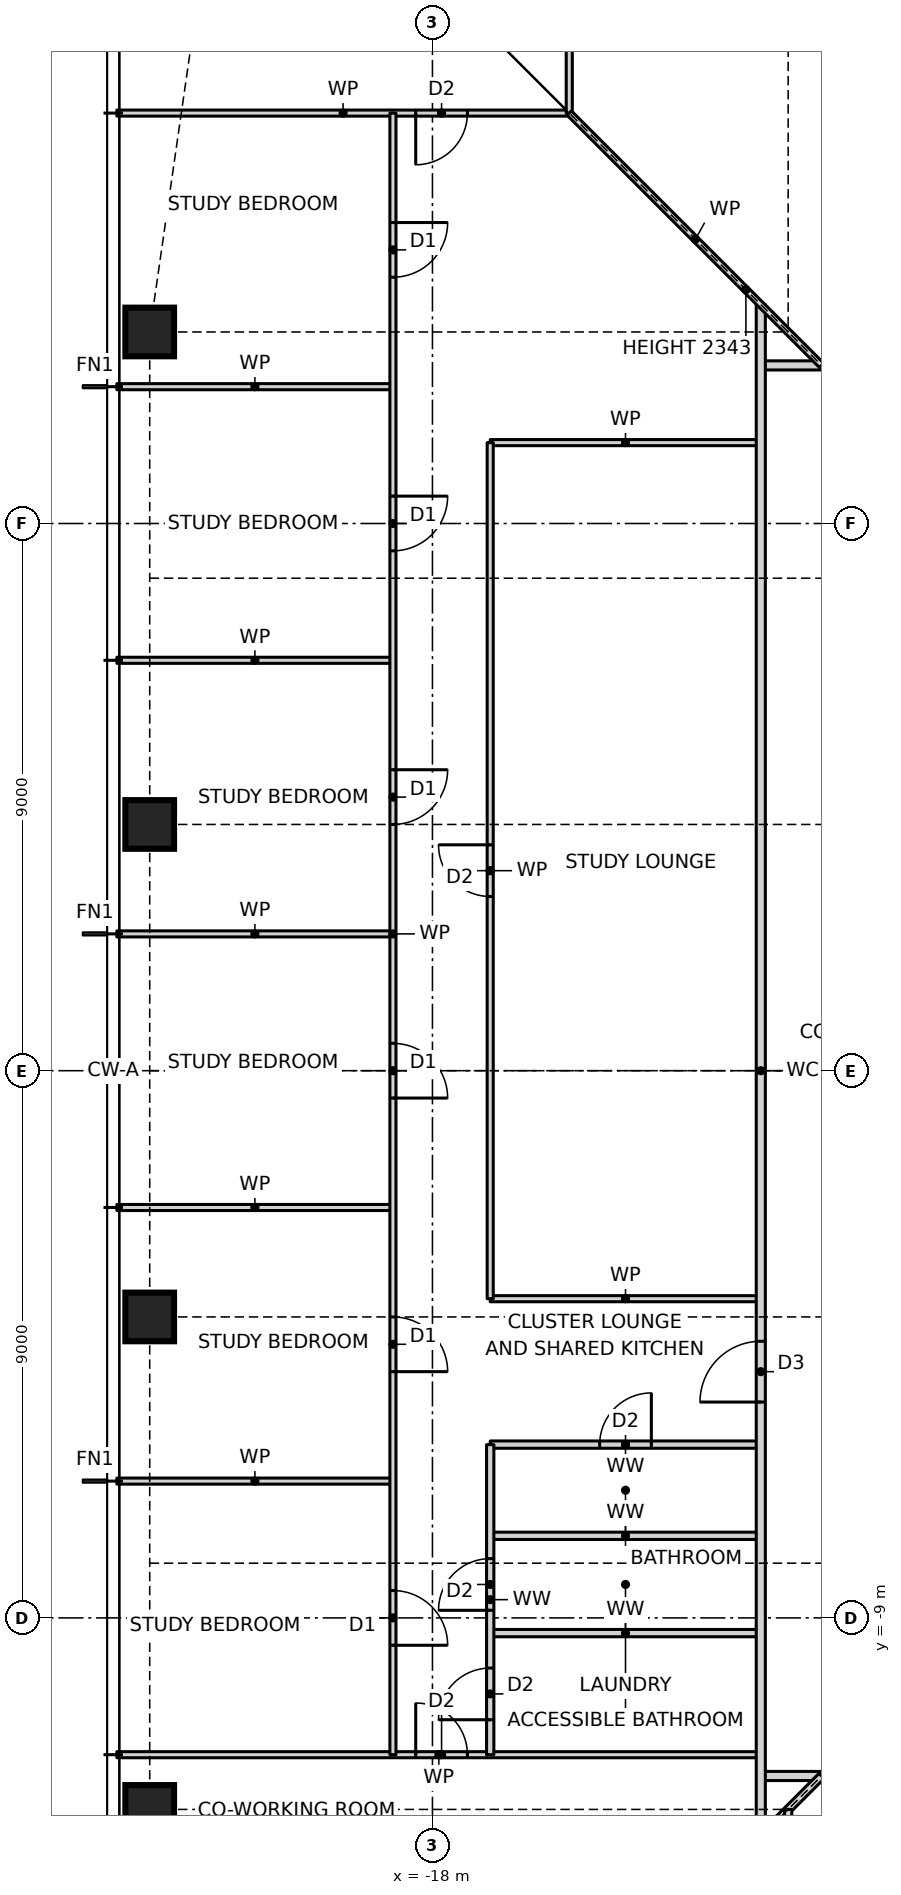
"""IFC4 building model, lengths in metres.
Left out: names, types, materials, properties, quantities, classifications, styles, units other than length and angle.
Written with IfcOpenShell. Run it as: python <this file> out.ifc"""

import sys

from ifc_helpers import new_model, si_unit, direction, frame, frame_2d, origin, origin_2d, place, context, subcontext, project, spatial, rectangle, hollow_rectangle, extrude, element, fill, save


model = new_model("IFC4")
c1 = context("Model", 3, precision=1e-05, world=origin(), true_north=direction((0.0, 1.0)))
c2 = subcontext(c1, "Body", "Model", "MODEL_VIEW")
j1 = project(units=[si_unit("LENGTHUNIT", "METRE"), si_unit("PLANEANGLEUNIT", "RADIAN")], contexts=[c1])
p1 = place(None, origin())
s1 = spatial("IfcSite", under=j1, at=p1, CompositionType="ELEMENT")
p2 = place(p1, origin())
s2 = spatial("IfcBuilding", under=s1, at=p2, CompositionType="ELEMENT")
p3 = place(p2, frame((0.0, 0.0, 46.5)))
s3 = spatial("IfcBuildingStorey", under=s2, at=p3, CompositionType="ELEMENT", Elevation=46.5)
for number, where, z_axis, x_axis in (
    (1, (-22.65, 12.15, 0.0), (0.0, 0.0, 1.0), (1.0, 0.0, 0.0)),
    (2, (-22.65, 4.05, 0.0), (0.0, 0.0, 1.0), (1.0, 0.0, 0.0)),
    (3, (-22.65, -4.05, 0.0), (0.0, 0.0, 1.0), (1.0, 0.0, 0.0)),
    (4, (-22.65, -12.15, 0.0), (0.0, 0.0, 1.0), (1.0, 0.0, 0.0)),
):
    element("IfcColumn", number, at=place(p3, frame(where, z_axis=z_axis, x_axis=x_axis)), inside=s3, PredefinedType="COLUMN", context=c2, shape_type="SweptSolid", body=[
        extrude(hollow_rectangle(XDim=0.8, YDim=0.8, WallThickness=0.09, at=origin_2d()), origin(), (0.0, 0.0, 1.0), 3.5),
    ])
p4 = place(p3, frame((-12.6, -11.6, 0.0), z_axis=(0.0, 0.0, 1.0), x_axis=(1.0, 0.0, 0.0)))
e5 = element("IfcWall", 5, at=p4, inside=s3, PredefinedType="PARTITIONING", context=c2, shape_type="SweptSolid", body=[
    extrude(rectangle(XDim=24.2, YDim=0.15, at=frame_2d((12.1, 0.0))), origin(), (0.0, 0.0, 1.0), 3.27),
])
p5 = place(p4, frame((2.64, 0.0, 0.0)))
e6 = element("IfcOpeningElement", 6, at=p5, cuts=e5, PredefinedType="OPENING", context=c2, shape_type="SweptSolid", body=[
    extrude(rectangle(XDim=1.0, YDim=2.1, at=frame_2d((0.5, 1.05))), frame((0.0, 0.085, 0.0), z_axis=(0.0, -1.0, 0.0), x_axis=(1.0, 0.0, 0.0)), (0.0, 0.0, 1.0), 0.17),
])
p6 = place(p4, frame((13.5, 0.0, 0.0)))
e7 = element("IfcOpeningElement", 7, at=p6, cuts=e5, PredefinedType="OPENING", context=c2, shape_type="SweptSolid", body=[
    extrude(rectangle(XDim=0.9, YDim=2.1, at=frame_2d((0.45, 1.05))), frame((0.0, 0.085, 0.0), z_axis=(0.0, -1.0, 0.0), x_axis=(1.0, 0.0, 0.0)), (0.0, 0.0, 1.0), 0.17),
])
p7 = place(p4, frame((22.025, 0.0, 0.0)))
e8 = element("IfcOpeningElement", 8, at=p7, cuts=e5, PredefinedType="OPENING", context=c2, shape_type="SweptSolid", body=[
    extrude(rectangle(XDim=1.0, YDim=2.1, at=frame_2d((0.5, 1.05))), frame((0.0, 0.085, 0.0), z_axis=(0.0, -1.0, 0.0), x_axis=(1.0, 0.0, 0.0)), (0.0, 0.0, 1.0), 0.17),
])
p8 = place(p3, frame((-23.19, -11.25, 0.0), z_axis=(0.0, 0.0, 1.0), x_axis=(1.0, 0.0, 0.0)))
e9 = element("IfcWall", 9, at=p8, inside=s3, PredefinedType="PARTITIONING", context=c2, shape_type="SweptSolid", body=[
    extrude(rectangle(XDim=10.59, YDim=0.1, at=frame_2d((5.295, 0.0))), origin(), (0.0, 0.0, 1.0), 3.27),
])
p9 = place(p8, frame((4.915, 0.0, 0.0)))
e10 = element("IfcOpeningElement", 10, at=p9, cuts=e9, PredefinedType="OPENING", context=c2, shape_type="SweptSolid", body=[
    extrude(rectangle(XDim=0.85, YDim=2.1, at=frame_2d((0.425, 1.05))), frame((0.0, 0.06, 0.0), z_axis=(0.0, -1.0, 0.0), x_axis=(1.0, 0.0, 0.0)), (0.0, 0.0, 1.0), 0.12),
])
for number, where, z_axis, x_axis in (
    (11, (-17.05, -9.25, 0.0), (0.0, 0.0, 1.0), (1.0, 0.0, 0.0)),
    (12, (-17.05, -7.65, 0.0), (0.0, 0.0, 1.0), (1.0, 0.0, 0.0)),
):
    element("IfcWall", number, at=place(p3, frame(where, z_axis=z_axis, x_axis=x_axis)), inside=s3, PredefinedType="PARTITIONING", context=c2, shape_type="SweptSolid", body=[
        extrude(rectangle(XDim=4.45, YDim=0.12, at=frame_2d((2.225, 0.0))), origin(), (0.0, 0.0, 1.0), 3.27),
    ])
p10 = place(p3, frame((-23.19, -6.75, 0.0), z_axis=(0.0, 0.0, 1.0), x_axis=(1.0, 0.0, 0.0)))
e13 = element("IfcWall", 13, at=p10, inside=s3, PredefinedType="PARTITIONING", context=c2, shape_type="SweptSolid", body=[
    extrude(rectangle(XDim=4.54, YDim=0.1, at=frame_2d((2.27, 0.0))), origin(), (0.0, 0.0, 1.0), 3.27),
])
p11 = place(p3, frame((-17.05, -6.15, 0.0), z_axis=(0.0, 0.0, 1.0), x_axis=(1.0, 0.0, 0.0)))
e14 = element("IfcWall", 14, at=p11, inside=s3, PredefinedType="PARTITIONING", context=c2, shape_type="SweptSolid", body=[
    extrude(rectangle(XDim=4.45, YDim=0.12, at=frame_2d((2.225, 0.0))), origin(), (0.0, 0.0, 1.0), 3.27),
])
p12 = place(p11, frame((1.8, 0.0, 0.0)))
e15 = element("IfcOpeningElement", 15, at=p12, cuts=e14, PredefinedType="OPENING", context=c2, shape_type="SweptSolid", body=[
    extrude(rectangle(XDim=0.85, YDim=2.1, at=frame_2d((0.425, 1.05))), frame((0.0, 0.07, 0.0), z_axis=(0.0, -1.0, 0.0), x_axis=(1.0, 0.0, 0.0)), (0.0, 0.0, 1.0), 0.14),
])
p13 = place(p3, frame((-17.05, -3.75, 0.0), z_axis=(0.0, 0.0, 1.0), x_axis=(1.0, 0.0, 0.0)))
e16 = element("IfcWall", 16, at=p13, inside=s3, PredefinedType="PARTITIONING", context=c2, shape_type="SweptSolid", body=[
    extrude(rectangle(XDim=4.45, YDim=0.1, at=frame_2d((2.225, 0.0))), origin(), (0.0, 0.0, 1.0), 3.27),
])
for number, where, z_axis, x_axis in (
    (17, (-23.19, -2.25, 0.0), (0.0, 0.0, 1.0), (1.0, 0.0, 0.0)),
    (18, (-23.19, 2.25, 0.0), (0.0, 0.0, 1.0), (1.0, 0.0, 0.0)),
    (19, (-23.19, 6.75, 0.0), (0.0, 0.0, 1.0), (1.0, 0.0, 0.0)),
):
    element("IfcWall", number, at=place(p3, frame(where, z_axis=z_axis, x_axis=x_axis)), inside=s3, PredefinedType="PARTITIONING", context=c2, shape_type="SweptSolid", body=[
        extrude(rectangle(XDim=4.54, YDim=0.1, at=frame_2d((2.27, 0.0))), origin(), (0.0, 0.0, 1.0), 3.27),
    ])
p14 = place(p3, frame((-17.05, 10.33, 0.0), z_axis=(0.0, 0.0, 1.0), x_axis=(1.0, 0.0, 0.0)))
e20 = element("IfcWall", 20, at=p14, inside=s3, PredefinedType="PARTITIONING", context=c2, shape_type="SweptSolid", body=[
    extrude(rectangle(XDim=4.45, YDim=0.1, at=frame_2d((2.225, 0.0))), origin(), (0.0, 0.0, 1.0), 3.27),
])
p15 = place(p3, frame((-23.19, 11.25, 0.0), z_axis=(0.0, 0.0, 1.0), x_axis=(1.0, 0.0, 0.0)))
e21 = element("IfcWall", 21, at=p15, inside=s3, PredefinedType="PARTITIONING", context=c2, shape_type="SweptSolid", body=[
    extrude(rectangle(XDim=4.54, YDim=0.1, at=frame_2d((2.27, 0.0))), origin(), (0.0, 0.0, 1.0), 3.27),
])
p16 = place(p3, frame((-12.6, 11.6, 0.0), z_axis=(0.0, 0.0, 1.0), x_axis=(1.0, 0.0, 0.0)))
e22 = element("IfcWall", 22, at=p16, inside=s3, PredefinedType="PARTITIONING", context=c2, shape_type="SweptSolid", body=[
    extrude(rectangle(XDim=24.2, YDim=0.15, at=frame_2d((12.1, 0.0))), origin(), (0.0, 0.0, 1.0), 3.27),
])
p17 = place(p16, frame((7.15, 0.0, 0.0)))
e23 = element("IfcOpeningElement", 23, at=p17, cuts=e22, PredefinedType="OPENING", context=c2, shape_type="SweptSolid", body=[
    extrude(rectangle(XDim=1.0, YDim=2.1, at=frame_2d((0.5, 1.05))), frame((0.0, 0.085, 0.0), z_axis=(0.0, -1.0, 0.0), x_axis=(1.0, 0.0, 0.0)), (0.0, 0.0, 1.0), 0.17),
])
p18 = place(p3, frame((-23.19, 15.75, 0.0), z_axis=(0.0, 0.0, 1.0), x_axis=(1.0, 0.0, 0.0)))
e24 = element("IfcWall", 24, at=p18, inside=s3, PredefinedType="PARTITIONING", context=c2, shape_type="SweptSolid", body=[
    extrude(rectangle(XDim=7.44, YDim=0.1, at=frame_2d((3.72, 0.0))), origin(), (0.0, 0.0, 1.0), 3.27),
])
p19 = place(p18, frame((4.915, 0.0, 0.0)))
e25 = element("IfcOpeningElement", 25, at=p19, cuts=e24, PredefinedType="OPENING", context=c2, shape_type="SweptSolid", body=[
    extrude(rectangle(XDim=0.85, YDim=2.1, at=frame_2d((0.425, 1.05))), frame((0.0, 0.06, 0.0), z_axis=(0.0, -1.0, 0.0), x_axis=(1.0, 0.0, 0.0)), (0.0, 0.0, 1.0), 0.12),
])
p20 = place(p3, frame((-15.75, -15.75, 0.0), z_axis=(0.0, 0.0, 1.0), x_axis=(0.707106781187, 0.707106781187, 0.0)))
e26 = element("IfcWall", 26, at=p20, inside=s3, PredefinedType="PARTITIONING", context=c2, shape_type="SweptSolid", body=[
    extrude(rectangle(XDim=5.869, YDim=0.12, at=frame_2d((2.935, 0.0))), origin(), (0.0, 0.0, 1.0), 2.343),
])
p21 = place(p3, frame((-12.15, -17.05, 0.0), z_axis=(0.0, 0.0, 1.0), x_axis=(0.0, 1.0, 0.0)))
e27 = element("IfcWall", 27, at=p21, inside=s3, PredefinedType="PARTITIONING", context=c2, shape_type="SweptSolid", body=[
    extrude(rectangle(XDim=4.9, YDim=0.12, at=frame_2d((2.45, 0.0))), origin(), (0.0, 0.0, 1.0), 2.508),
])
p22 = place(p21, frame((2.025, 0.0, 0.0)))
e28 = element("IfcOpeningElement", 28, at=p22, cuts=e27, PredefinedType="OPENING", context=c2, shape_type="SweptSolid", body=[
    extrude(rectangle(XDim=0.85, YDim=2.1, at=frame_2d((0.425, 1.05))), frame((0.0, 0.07, 0.0), z_axis=(0.0, -1.0, 0.0), x_axis=(1.0, 0.0, 0.0)), (0.0, 0.0, 1.0), 0.14),
])
p23 = place(p3, frame((-12.6, -12.6, 0.0), z_axis=(0.0, 0.0, 1.0), x_axis=(0.0, 1.0, 0.0)))
e29 = element("IfcWall", 29, at=p23, inside=s3, PredefinedType="PARTITIONING", context=c2, shape_type="SweptSolid", body=[
    extrude(rectangle(XDim=25.2, YDim=0.15, at=frame_2d((12.6, 0.0))), origin(), (0.0, 0.0, 1.0), 3.27),
])
p24 = place(p23, frame((7.15, 0.0, 0.0)))
e30 = element("IfcOpeningElement", 30, at=p24, cuts=e29, PredefinedType="OPENING", context=c2, shape_type="SweptSolid", body=[
    extrude(rectangle(XDim=1.0, YDim=2.1, at=frame_2d((0.5, 1.05))), frame((0.0, 0.085, 0.0), z_axis=(0.0, -1.0, 0.0), x_axis=(1.0, 0.0, 0.0)), (0.0, 0.0, 1.0), 0.17),
])
p25 = place(p3, frame((-15.75, 15.75, 0.0), z_axis=(0.0, 0.0, 1.0), x_axis=(0.0, 1.0, 0.0)))
e31 = element("IfcWall", 31, at=p25, inside=s3, PredefinedType="PARTITIONING", context=c2, shape_type="SweptSolid", body=[
    extrude(rectangle(XDim=7.44, YDim=0.1, at=frame_2d((3.72, 0.0))), origin(), (0.0, 0.0, 1.0), 3.27),
])
p26 = place(p3, frame((-17.05, -11.25, 0.0), z_axis=(0.0, 0.0, 1.0), x_axis=(0.0, 1.0, 0.0)))
e32 = element("IfcWall", 32, at=p26, inside=s3, PredefinedType="PARTITIONING", context=c2, shape_type="SweptSolid", body=[
    extrude(rectangle(XDim=5.1, YDim=0.12, at=frame_2d((2.55, 0.0))), origin(), (0.0, 0.0, 1.0), 3.27),
])
p27 = place(p26, frame((2.375, 0.0, 0.0)))
e33 = element("IfcOpeningElement", 33, at=p27, cuts=e32, PredefinedType="OPENING", context=c2, shape_type="SweptSolid", body=[
    extrude(rectangle(XDim=0.85, YDim=2.1, at=frame_2d((0.425, 1.05))), frame((0.0, 0.07, 0.0), z_axis=(0.0, -1.0, 0.0), x_axis=(1.0, 0.0, 0.0)), (0.0, 0.0, 1.0), 0.14),
])
p28 = place(p26, frame((0.575, 0.0, 0.0)))
e34 = element("IfcOpeningElement", 34, at=p28, cuts=e32, PredefinedType="OPENING", context=c2, shape_type="SweptSolid", body=[
    extrude(rectangle(XDim=0.85, YDim=2.1, at=frame_2d((0.425, 1.05))), frame((0.0, 0.07, 0.0), z_axis=(0.0, -1.0, 0.0), x_axis=(1.0, 0.0, 0.0)), (0.0, 0.0, 1.0), 0.14),
])
p29 = place(p3, frame((-17.05, -3.75, 0.0), z_axis=(0.0, 0.0, 1.0), x_axis=(0.0, 1.0, 0.0)))
e35 = element("IfcWall", 35, at=p29, inside=s3, PredefinedType="PARTITIONING", context=c2, shape_type="SweptSolid", body=[
    extrude(rectangle(XDim=14.08, YDim=0.1, at=frame_2d((7.04, 0.0))), origin(), (0.0, 0.0, 1.0), 3.27),
])
p30 = place(p29, frame((6.615, 0.0, 0.0)))
e36 = element("IfcOpeningElement", 36, at=p30, cuts=e35, PredefinedType="OPENING", context=c2, shape_type="SweptSolid", body=[
    extrude(rectangle(XDim=0.85, YDim=2.1, at=frame_2d((0.425, 1.05))), frame((0.0, 0.06, 0.0), z_axis=(0.0, -1.0, 0.0), x_axis=(1.0, 0.0, 0.0)), (0.0, 0.0, 1.0), 0.12),
])
p31 = place(p3, frame((-18.65, -11.25, 0.0), z_axis=(0.0, 0.0, 1.0), x_axis=(0.0, 1.0, 0.0)))
e37 = element("IfcWall", 37, at=p31, inside=s3, PredefinedType="PARTITIONING", context=c2, shape_type="SweptSolid", body=[
    extrude(rectangle(XDim=27.0, YDim=0.1, at=frame_2d((13.5, 0.0))), origin(), (0.0, 0.0, 1.0), 3.27),
])
p32 = place(p31, frame((24.3, 0.0, 0.0)))
e38 = element("IfcOpeningElement", 38, at=p32, cuts=e37, PredefinedType="OPENING", context=c2, shape_type="SweptSolid", body=[
    extrude(rectangle(XDim=0.9, YDim=2.1, at=frame_2d((0.45, 1.05))), frame((0.0, 0.06, 0.0), z_axis=(0.0, -1.0, 0.0), x_axis=(1.0, 0.0, 0.0)), (0.0, 0.0, 1.0), 0.12),
])
p33 = place(p31, frame((19.8, 0.0, 0.0)))
e39 = element("IfcOpeningElement", 39, at=p33, cuts=e37, PredefinedType="OPENING", context=c2, shape_type="SweptSolid", body=[
    extrude(rectangle(XDim=0.9, YDim=2.1, at=frame_2d((0.45, 1.05))), frame((0.0, 0.06, 0.0), z_axis=(0.0, -1.0, 0.0), x_axis=(1.0, 0.0, 0.0)), (0.0, 0.0, 1.0), 0.12),
])
p34 = place(p31, frame((15.3, 0.0, 0.0)))
e40 = element("IfcOpeningElement", 40, at=p34, cuts=e37, PredefinedType="OPENING", context=c2, shape_type="SweptSolid", body=[
    extrude(rectangle(XDim=0.9, YDim=2.1, at=frame_2d((0.45, 1.05))), frame((0.0, 0.06, 0.0), z_axis=(0.0, -1.0, 0.0), x_axis=(1.0, 0.0, 0.0)), (0.0, 0.0, 1.0), 0.12),
])
p35 = place(p31, frame((10.8, 0.0, 0.0)))
e41 = element("IfcOpeningElement", 41, at=p35, cuts=e37, PredefinedType="OPENING", context=c2, shape_type="SweptSolid", body=[
    extrude(rectangle(XDim=0.9, YDim=2.1, at=frame_2d((0.45, 1.05))), frame((0.0, 0.06, 0.0), z_axis=(0.0, -1.0, 0.0), x_axis=(1.0, 0.0, 0.0)), (0.0, 0.0, 1.0), 0.12),
])
p36 = place(p31, frame((6.3, 0.0, 0.0)))
e42 = element("IfcOpeningElement", 42, at=p36, cuts=e37, PredefinedType="OPENING", context=c2, shape_type="SweptSolid", body=[
    extrude(rectangle(XDim=0.9, YDim=2.1, at=frame_2d((0.45, 1.05))), frame((0.0, 0.06, 0.0), z_axis=(0.0, -1.0, 0.0), x_axis=(1.0, 0.0, 0.0)), (0.0, 0.0, 1.0), 0.12),
])
p37 = place(p31, frame((1.8, 0.0, 0.0)))
e43 = element("IfcOpeningElement", 43, at=p37, cuts=e37, PredefinedType="OPENING", context=c2, shape_type="SweptSolid", body=[
    extrude(rectangle(XDim=0.9, YDim=2.1, at=frame_2d((0.45, 1.05))), frame((0.0, 0.06, 0.0), z_axis=(0.0, -1.0, 0.0), x_axis=(1.0, 0.0, 0.0)), (0.0, 0.0, 1.0), 0.12),
])
p38 = place(p3, frame((-11.6, 11.6, 0.0), z_axis=(0.0, 0.0, 1.0), x_axis=(-0.707106781187, 0.707106781187, 0.0)))
e44 = element("IfcWall", 44, at=p38, inside=s3, PredefinedType="PARTITIONING", context=c2, shape_type="SweptSolid", body=[
    extrude(rectangle(XDim=5.869, YDim=0.1, at=frame_2d((2.935, 0.0))), origin(), (0.0, 0.0, 1.0), 2.343),
])
p39 = place(p32, frame((0.9, 0.0, 0.0), z_axis=(0.0, 0.0, 1.0), x_axis=(-1.0, 0.0, 0.0)))
e45 = element("IfcDoor", 45, at=p39, inside=s3, OperationType="SINGLE_SWING_LEFT", PredefinedType="DOOR", context=c2, shape_type="SweptSolid", body=[
    extrude(rectangle(XDim=0.9, YDim=2.1, at=frame_2d((0.45, 1.05))), frame((0.0, 0.025, 0.0), z_axis=(0.0, -1.0, 0.0), x_axis=(1.0, 0.0, 0.0)), (0.0, 0.0, 1.0), 0.05),
])
fill(e38, e45)
p40 = place(p33, frame((0.9, 0.0, 0.0), z_axis=(0.0, 0.0, 1.0), x_axis=(-1.0, 0.0, 0.0)))
e46 = element("IfcDoor", 46, at=p40, inside=s3, OperationType="SINGLE_SWING_LEFT", PredefinedType="DOOR", context=c2, shape_type="SweptSolid", body=[
    extrude(rectangle(XDim=0.9, YDim=2.1, at=frame_2d((0.45, 1.05))), frame((0.0, 0.025, 0.0), z_axis=(0.0, -1.0, 0.0), x_axis=(1.0, 0.0, 0.0)), (0.0, 0.0, 1.0), 0.05),
])
fill(e39, e46)
p41 = place(p34, frame((0.9, 0.0, 0.0), z_axis=(0.0, 0.0, 1.0), x_axis=(-1.0, 0.0, 0.0)))
e47 = element("IfcDoor", 47, at=p41, inside=s3, OperationType="SINGLE_SWING_LEFT", PredefinedType="DOOR", context=c2, shape_type="SweptSolid", body=[
    extrude(rectangle(XDim=0.9, YDim=2.1, at=frame_2d((0.45, 1.05))), frame((0.0, 0.025, 0.0), z_axis=(0.0, -1.0, 0.0), x_axis=(1.0, 0.0, 0.0)), (0.0, 0.0, 1.0), 0.05),
])
fill(e40, e47)
p42 = place(p35, frame((0.9, 0.0, 0.0), z_axis=(0.0, 0.0, 1.0), x_axis=(-1.0, 0.0, 0.0)))
e48 = element("IfcDoor", 48, at=p42, inside=s3, OperationType="SINGLE_SWING_RIGHT", PredefinedType="DOOR", context=c2, shape_type="SweptSolid", body=[
    extrude(rectangle(XDim=0.9, YDim=2.1, at=frame_2d((0.45, 1.05))), frame((0.0, 0.025, 0.0), z_axis=(0.0, -1.0, 0.0), x_axis=(1.0, 0.0, 0.0)), (0.0, 0.0, 1.0), 0.05),
])
fill(e41, e48)
p43 = place(p36, frame((0.9, 0.0, 0.0), z_axis=(0.0, 0.0, 1.0), x_axis=(-1.0, 0.0, 0.0)))
e49 = element("IfcDoor", 49, at=p43, inside=s3, OperationType="SINGLE_SWING_RIGHT", PredefinedType="DOOR", context=c2, shape_type="SweptSolid", body=[
    extrude(rectangle(XDim=0.9, YDim=2.1, at=frame_2d((0.45, 1.05))), frame((0.0, 0.025, 0.0), z_axis=(0.0, -1.0, 0.0), x_axis=(1.0, 0.0, 0.0)), (0.0, 0.0, 1.0), 0.05),
])
fill(e42, e49)
p44 = place(p37, frame((0.9, 0.0, 0.0), z_axis=(0.0, 0.0, 1.0), x_axis=(-1.0, 0.0, 0.0)))
e50 = element("IfcDoor", 50, at=p44, inside=s3, OperationType="SINGLE_SWING_RIGHT", PredefinedType="DOOR", context=c2, shape_type="SweptSolid", body=[
    extrude(rectangle(XDim=0.9, YDim=2.1, at=frame_2d((0.45, 1.05))), frame((0.0, 0.025, 0.0), z_axis=(0.0, -1.0, 0.0), x_axis=(1.0, 0.0, 0.0)), (0.0, 0.0, 1.0), 0.05),
])
fill(e43, e50)
p45 = place(p24, origin())
e51 = element("IfcDoor", 51, at=p45, inside=s3, OperationType="SINGLE_SWING_LEFT", PredefinedType="DOOR", context=c2, shape_type="SweptSolid", body=[
    extrude(rectangle(XDim=1.0, YDim=2.1, at=frame_2d((0.5, 1.05))), frame((0.0, 0.025, 0.0), z_axis=(0.0, -1.0, 0.0), x_axis=(1.0, 0.0, 0.0)), (0.0, 0.0, 1.0), 0.05),
])
fill(e30, e51)
p46 = place(p30, origin())
e52 = element("IfcDoor", 52, at=p46, inside=s3, OperationType="SINGLE_SWING_RIGHT", PredefinedType="DOOR", context=c2, shape_type="SweptSolid", body=[
    extrude(rectangle(XDim=0.85, YDim=2.1, at=frame_2d((0.425, 1.05))), frame((0.0, 0.025, 0.0), z_axis=(0.0, -1.0, 0.0), x_axis=(1.0, 0.0, 0.0)), (0.0, 0.0, 1.0), 0.05),
])
fill(e36, e52)
p47 = place(p12, origin())
e53 = element("IfcDoor", 53, at=p47, inside=s3, OperationType="SINGLE_SWING_RIGHT", PredefinedType="DOOR", context=c2, shape_type="SweptSolid", body=[
    extrude(rectangle(XDim=0.85, YDim=2.1, at=frame_2d((0.425, 1.05))), frame((0.0, 0.025, 0.0), z_axis=(0.0, -1.0, 0.0), x_axis=(1.0, 0.0, 0.0)), (0.0, 0.0, 1.0), 0.05),
])
fill(e15, e53)
p48 = place(p27, origin())
e54 = element("IfcDoor", 54, at=p48, inside=s3, OperationType="SINGLE_SWING_LEFT", PredefinedType="DOOR", context=c2, shape_type="SweptSolid", body=[
    extrude(rectangle(XDim=0.85, YDim=2.1, at=frame_2d((0.425, 1.05))), frame((0.0, 0.025, 0.0), z_axis=(0.0, -1.0, 0.0), x_axis=(1.0, 0.0, 0.0)), (0.0, 0.0, 1.0), 0.05),
])
fill(e33, e54)
p49 = place(p28, origin())
e55 = element("IfcDoor", 55, at=p49, inside=s3, OperationType="SINGLE_SWING_LEFT", PredefinedType="DOOR", context=c2, shape_type="SweptSolid", body=[
    extrude(rectangle(XDim=0.85, YDim=2.1, at=frame_2d((0.425, 1.05))), frame((0.0, 0.025, 0.0), z_axis=(0.0, -1.0, 0.0), x_axis=(1.0, 0.0, 0.0)), (0.0, 0.0, 1.0), 0.05),
])
fill(e34, e55)
p50 = place(p9, origin())
e56 = element("IfcDoor", 56, at=p50, inside=s3, OperationType="SINGLE_SWING_LEFT", PredefinedType="DOOR", context=c2, shape_type="SweptSolid", body=[
    extrude(rectangle(XDim=0.85, YDim=2.1, at=frame_2d((0.425, 1.05))), frame((0.0, 0.025, 0.0), z_axis=(0.0, -1.0, 0.0), x_axis=(1.0, 0.0, 0.0)), (0.0, 0.0, 1.0), 0.05),
])
fill(e10, e56)
p51 = place(p19, frame((0.85, 0.0, 0.0), z_axis=(0.0, 0.0, 1.0), x_axis=(-1.0, 0.0, 0.0)))
e57 = element("IfcDoor", 57, at=p51, inside=s3, OperationType="SINGLE_SWING_RIGHT", PredefinedType="DOOR", context=c2, shape_type="SweptSolid", body=[
    extrude(rectangle(XDim=0.85, YDim=2.1, at=frame_2d((0.425, 1.05))), frame((0.0, 0.025, 0.0), z_axis=(0.0, -1.0, 0.0), x_axis=(1.0, 0.0, 0.0)), (0.0, 0.0, 1.0), 0.05),
])
fill(e25, e57)
save(model, sys.argv[1])
